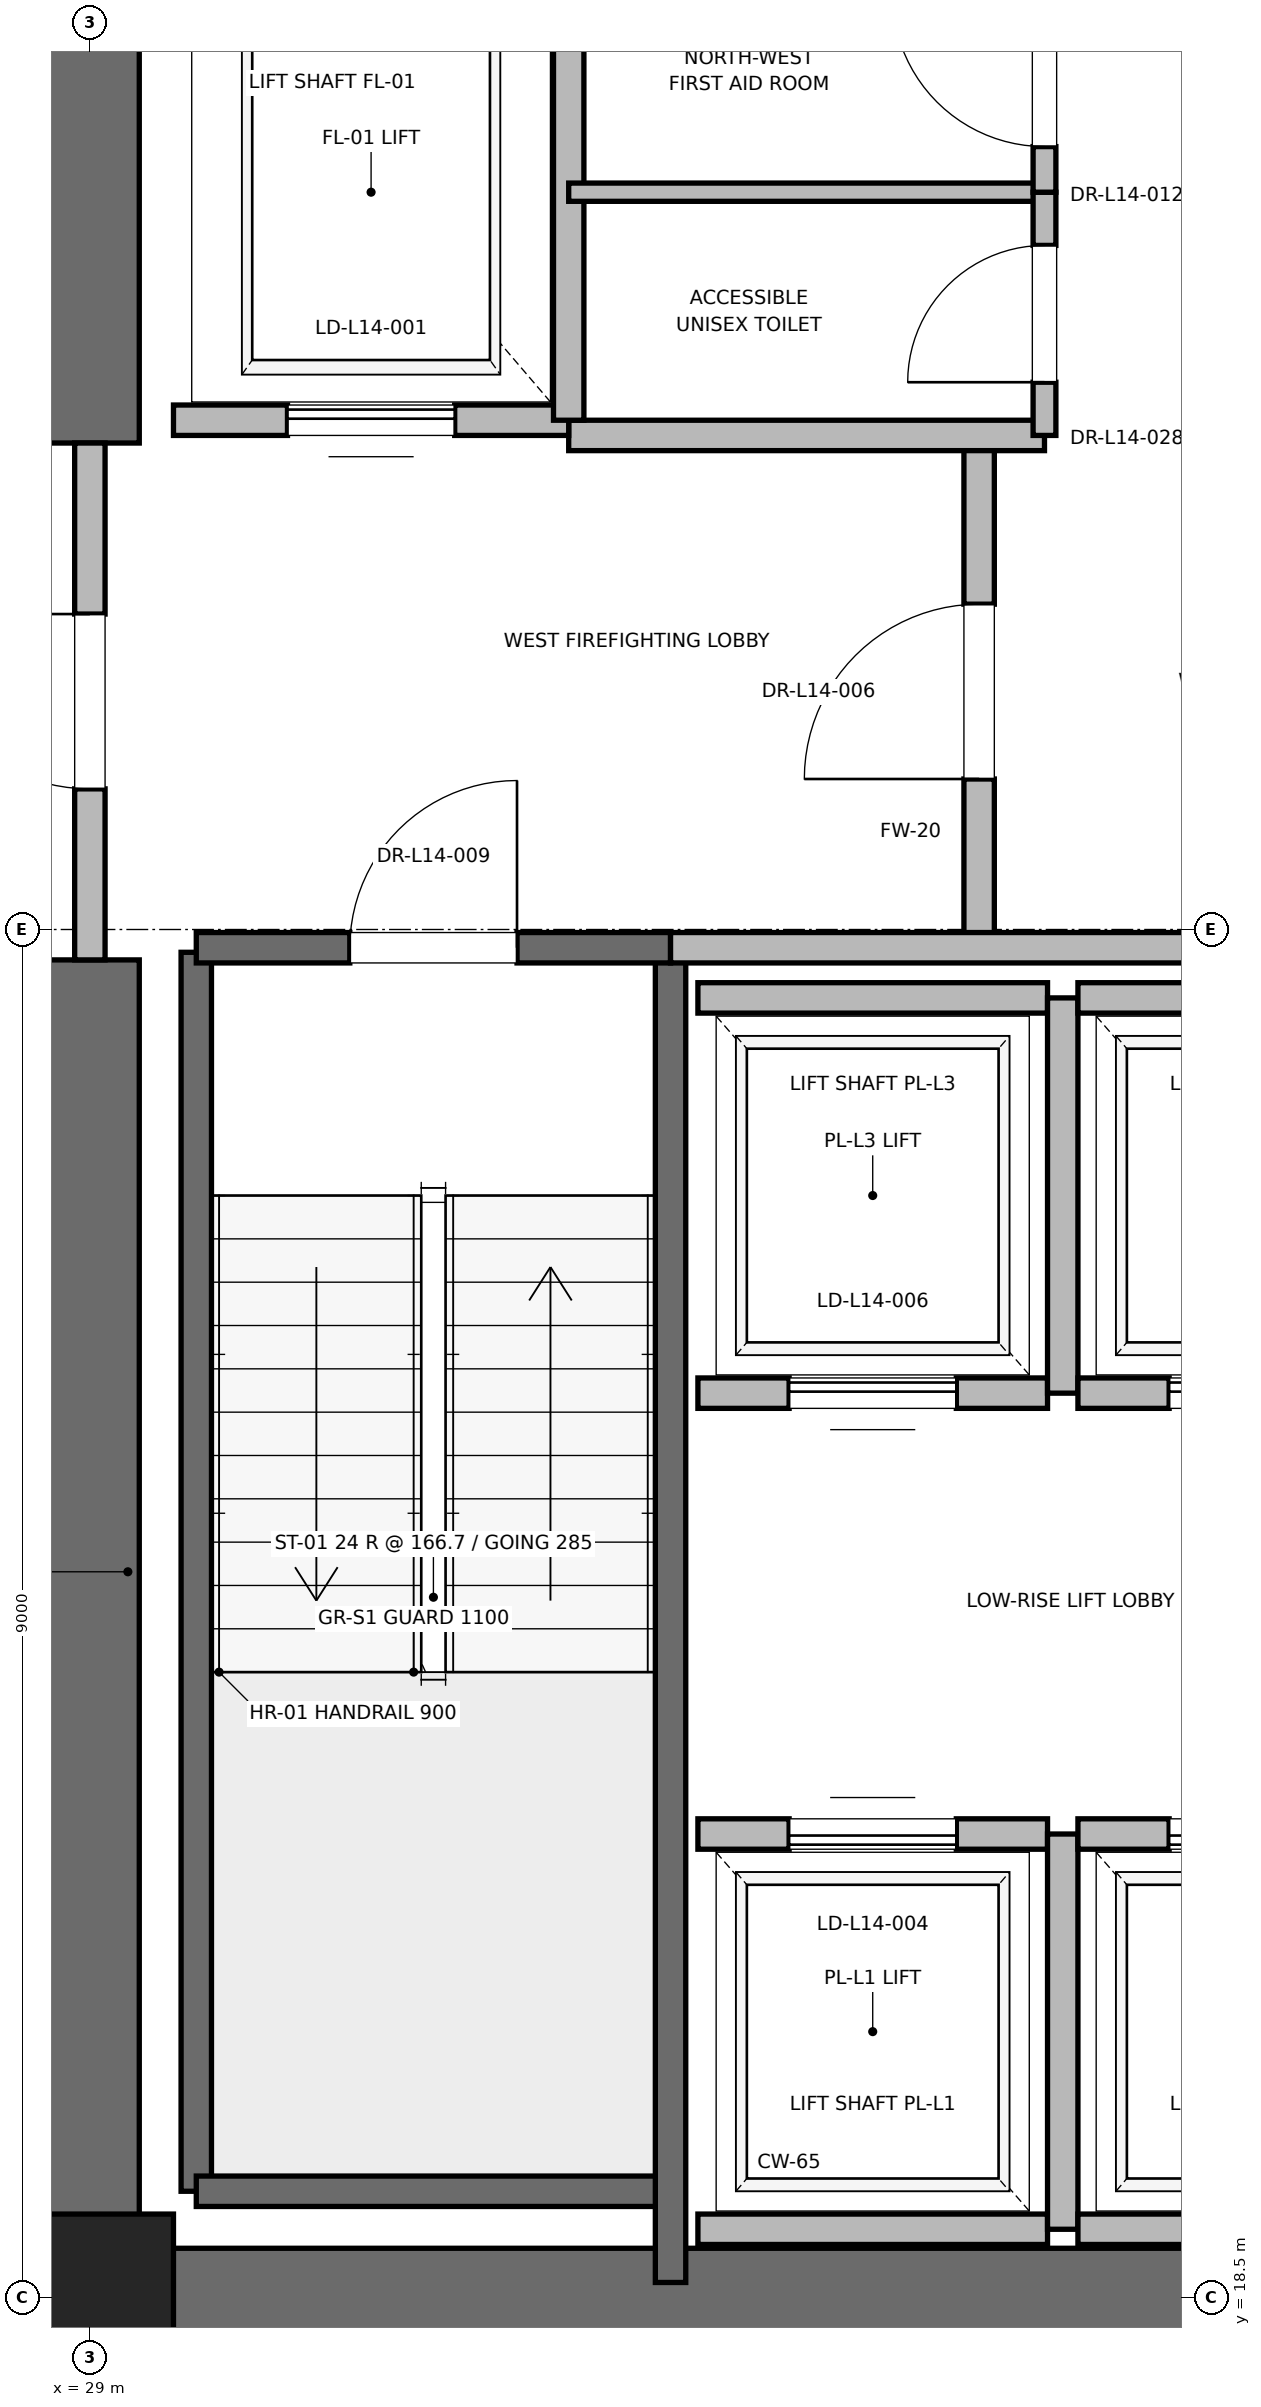
"""IFC4 building model, lengths in metres.
Left out: names, types, materials, properties, quantities, classifications, styles, units other than length and angle.
Written with IfcOpenShell. Run it as: python <this file> out.ifc"""

import sys

from ifc_helpers import new_model, si_unit, direction, frame, frame_2d, origin, origin_2d, place, context, subcontext, project, spatial, rectangle, extrude, element, fill, save


model = new_model("IFC4")
c1 = context("Model", 3, precision=1e-05, world=origin(), true_north=direction((0.0, 1.0)))
c2 = subcontext(c1, "Body", "Model", "MODEL_VIEW")
j1 = project(units=[si_unit("LENGTHUNIT", "METRE"), si_unit("PLANEANGLEUNIT", "RADIAN")], contexts=[c1])
p1 = place(None, origin())
s1 = spatial("IfcSite", under=j1, at=p1, CompositionType="ELEMENT")
p2 = place(p1, origin())
s2 = spatial("IfcBuilding", under=s1, at=p2, CompositionType="ELEMENT")
p3 = place(p2, frame((0.0, 0.0, 63.6)))
s3 = spatial("IfcBuildingStorey", under=s2, at=p3, CompositionType="ELEMENT", Elevation=63.6)
p4 = place(p3, frame((29.0, 18.5, 0.0), z_axis=(0.0, 0.0, 1.0), x_axis=(1.0, 0.0, 0.0)))
e1 = element("IfcColumn", 1, at=p4, inside=s3, PredefinedType="PILASTER", context=c2, shape_type="SweptSolid", body=[
    extrude(rectangle(XDim=1.1, YDim=1.1, at=origin_2d()), origin(), (0.0, 0.0, 1.0), 4.0),
])
p5 = place(p3, frame((29.0, 18.5, 0.0), z_axis=(0.0, 0.0, 1.0), x_axis=(1.0, 0.0, 0.0)))
e2 = element("IfcWall", 2, at=p5, inside=s3, PredefinedType="SHEAR", context=c2, shape_type="SweptSolid", body=[
    extrude(rectangle(XDim=9.2, YDim=0.65, at=frame_2d((4.6, 0.0))), origin(), (0.0, 0.0, 1.0), 3.76),
])
p6 = place(p3, frame((29.0, 18.5, 0.0), z_axis=(0.0, 0.0, 1.0), x_axis=(0.0, 1.0, 0.0)))
e3 = element("IfcWall", 3, at=p6, inside=s3, PredefinedType="SHEAR", context=c2, shape_type="SweptSolid", body=[
    extrude(rectangle(XDim=8.8, YDim=0.65, at=frame_2d((4.4, 0.0))), origin(), (0.0, 0.0, 1.0), 3.76),
])
p7 = place(p3, frame((29.0, 30.7, 0.0), z_axis=(0.0, 0.0, 1.0), x_axis=(0.0, 1.0, 0.0)))
e4 = element("IfcWall", 4, at=p7, inside=s3, PredefinedType="SHEAR", context=c2, shape_type="SweptSolid", body=[
    extrude(rectangle(XDim=5.8, YDim=0.65, at=frame_2d((2.9, 0.0))), origin(), (0.0, 0.0, 1.0), 3.76),
])
p8 = place(p3, frame((29.7, 19.2, 0.0), z_axis=(0.0, 0.0, 1.0), x_axis=(0.0, 1.0, 0.0)))
e5 = element("IfcWall", 5, at=p8, inside=s3, PredefinedType="SOLIDWALL", context=c2, shape_type="SweptSolid", body=[
    extrude(rectangle(XDim=8.15, YDim=0.2, at=frame_2d((4.075, 0.0))), origin(), (0.0, 0.0, 1.0), 3.76),
])
p9 = place(p3, frame((29.7, 19.2, 0.0), z_axis=(0.0, 0.0, 1.0), x_axis=(1.0, 0.0, 0.0)))
e6 = element("IfcWall", 6, at=p9, inside=s3, PredefinedType="SOLIDWALL", context=c2, shape_type="SweptSolid", body=[
    extrude(rectangle(XDim=3.12, YDim=0.2, at=frame_2d((1.56, 0.0))), origin(), (0.0, 0.0, 1.0), 3.76),
])
p10 = place(p3, frame((32.82, 18.6, 0.0), z_axis=(0.0, 0.0, 1.0), x_axis=(0.0, 1.0, 0.0)))
e7 = element("IfcWall", 7, at=p10, inside=s3, PredefinedType="SOLIDWALL", context=c2, shape_type="SweptSolid", body=[
    extrude(rectangle(XDim=8.78, YDim=0.2, at=frame_2d((4.39, 0.0))), origin(), (0.0, 0.0, 1.0), 3.76),
])
p11 = place(p3, frame((29.7, 27.38, 0.0), z_axis=(0.0, 0.0, 1.0), x_axis=(1.0, 0.0, 0.0)))
e8 = element("IfcWall", 8, at=p11, inside=s3, PredefinedType="SOLIDWALL", context=c2, shape_type="SweptSolid", body=[
    extrude(rectangle(XDim=3.12, YDim=0.2, at=frame_2d((1.56, 0.0))), origin(), (0.0, 0.0, 1.0), 3.76),
])
p12 = place(p11, frame((1.01, 0.0, 0.0)))
e9 = element("IfcOpeningElement", 9, at=p12, cuts=e8, PredefinedType="OPENING", context=c2, shape_type="SweptSolid", body=[
    extrude(rectangle(XDim=1.1, YDim=2.15, at=frame_2d((0.55, 1.075))), frame((0.0, 0.1, 0.0), z_axis=(0.0, -1.0, 0.0), x_axis=(1.0, 0.0, 0.0)), (0.0, 0.0, 1.0), 0.2),
])
p13 = place(p3, frame((34.85, 27.38, 0.0), z_axis=(0.0, 0.0, 1.0), x_axis=(0.0, 1.0, 0.0)))
e10 = element("IfcWall", 10, at=p13, inside=s3, PredefinedType="PARTITIONING", context=c2, shape_type="SweptSolid", body=[
    extrude(rectangle(XDim=3.37, YDim=0.2, at=frame_2d((1.685, 0.0))), origin(), (0.0, 0.0, 1.0), 3.76),
])
p14 = place(p13, frame((1.11, 0.0, 0.0)))
e11 = element("IfcOpeningElement", 11, at=p14, cuts=e10, PredefinedType="OPENING", context=c2, shape_type="SweptSolid", body=[
    extrude(rectangle(XDim=1.15, YDim=2.2, at=frame_2d((0.575, 1.1))), frame((0.0, 0.1, 0.0), z_axis=(0.0, -1.0, 0.0), x_axis=(1.0, 0.0, 0.0)), (0.0, 0.0, 1.0), 0.2),
])
p15 = place(p3, frame((29.0, 27.3, 0.0), z_axis=(0.0, 0.0, 1.0), x_axis=(0.0, 1.0, 0.0)))
e12 = element("IfcWall", 12, at=p15, inside=s3, PredefinedType="PARTITIONING", context=c2, shape_type="SweptSolid", body=[
    extrude(rectangle(XDim=3.4, YDim=0.2, at=frame_2d((1.7, 0.0))), origin(), (0.0, 0.0, 1.0), 2.54),
])
p16 = place(p15, frame((1.125, 0.0, 0.0)))
e13 = element("IfcOpeningElement", 13, at=p16, cuts=e12, PredefinedType="OPENING", context=c2, shape_type="SweptSolid", body=[
    extrude(rectangle(XDim=1.15, YDim=2.2, at=frame_2d((0.575, 1.1))), frame((0.0, 0.1, 0.0), z_axis=(0.0, -1.0, 0.0), x_axis=(1.0, 0.0, 0.0)), (0.0, 0.0, 1.0), 0.2),
])
p17 = place(p3, frame((32.82, 27.38, 0.0), z_axis=(0.0, 0.0, 1.0), x_axis=(1.0, 0.0, 0.0)))
e14 = element("IfcWall", 14, at=p17, inside=s3, PredefinedType="PARTITIONING", context=c2, shape_type="SweptSolid", body=[
    extrude(rectangle(XDim=5.62, YDim=0.2, at=frame_2d((2.81, 0.0))), origin(), (0.0, 0.0, 1.0), 3.76),
])
p18 = place(p3, frame((32.15, 30.75, 0.0), z_axis=(0.0, 0.0, 1.0), x_axis=(1.0, 0.0, 0.0)))
e15 = element("IfcWall", 15, at=p18, inside=s3, PredefinedType="PARTITIONING", context=c2, shape_type="SweptSolid", body=[
    extrude(rectangle(XDim=3.13, YDim=0.2, at=frame_2d((1.565, 0.0))), origin(), (0.0, 0.0, 1.0), 3.76),
])
p19 = place(p3, frame((29.55, 30.85, 0.0), z_axis=(0.0, 0.0, 1.0), x_axis=(1.0, 0.0, 0.0)))
e16 = element("IfcWall", 16, at=p19, inside=s3, PredefinedType="SOLIDWALL", context=c2, shape_type="SweptSolid", body=[
    extrude(rectangle(XDim=2.6, YDim=0.2, at=frame_2d((1.3, 0.0))), origin(), (0.0, 0.0, 1.0), 2.54),
])
p20 = place(p19, frame((0.75, 0.0, 0.0)))
e17 = element("IfcOpeningElement", 17, at=p20, cuts=e16, PredefinedType="OPENING", context=c2, shape_type="SweptSolid", body=[
    extrude(rectangle(XDim=1.1, YDim=2.2, at=frame_2d((0.55, 1.1))), frame((0.0, 0.1, 0.0), z_axis=(0.0, -1.0, 0.0), x_axis=(1.0, 0.0, 0.0)), (0.0, 0.0, 1.0), 0.2),
])
p21 = place(p3, frame((32.15, 30.85, 0.0), z_axis=(0.0, 0.0, 1.0), x_axis=(0.0, 1.0, 0.0)))
e18 = element("IfcWall", 18, at=p21, inside=s3, PredefinedType="SOLIDWALL", context=c2, shape_type="SweptSolid", body=[
    extrude(rectangle(XDim=3.0, YDim=0.2, at=frame_2d((1.5, 0.0))), origin(), (0.0, 0.0, 1.0), 3.76),
])
p22 = place(p3, frame((33.0, 18.95, 0.0), z_axis=(0.0, 0.0, 1.0), x_axis=(1.0, 0.0, 0.0)))
e19 = element("IfcWall", 19, at=p22, inside=s3, PredefinedType="SOLIDWALL", context=c2, shape_type="SweptSolid", body=[
    extrude(rectangle(XDim=2.3, YDim=0.2, at=frame_2d((1.15, 0.0))), origin(), (0.0, 0.0, 1.0), 3.76),
])
p23 = place(p3, frame((35.3, 21.55, 0.0), z_axis=(0.0, 0.0, 1.0), x_axis=(-1.0, 0.0, 0.0)))
e20 = element("IfcWall", 20, at=p23, inside=s3, PredefinedType="SOLIDWALL", context=c2, shape_type="SweptSolid", body=[
    extrude(rectangle(XDim=2.3, YDim=0.2, at=frame_2d((1.15, 0.0))), origin(), (0.0, 0.0, 1.0), 3.76),
])
p24 = place(p23, frame((0.6, 0.0, 0.0)))
e21 = element("IfcOpeningElement", 21, at=p24, cuts=e20, PredefinedType="OPENING", context=c2, shape_type="SweptSolid", body=[
    extrude(rectangle(XDim=1.1, YDim=2.2, at=frame_2d((0.55, 1.1))), frame((0.0, 0.1, 0.0), z_axis=(0.0, -1.0, 0.0), x_axis=(1.0, 0.0, 0.0)), (0.0, 0.0, 1.0), 0.2),
])
p25 = place(p3, frame((35.4, 18.95, 0.0), z_axis=(0.0, 0.0, 1.0), x_axis=(0.0, 1.0, 0.0)))
e22 = element("IfcWall", 22, at=p25, inside=s3, PredefinedType="SOLIDWALL", context=c2, shape_type="SweptSolid", body=[
    extrude(rectangle(XDim=2.6, YDim=0.2, at=frame_2d((1.3, 0.0))), origin(), (0.0, 0.0, 1.0), 3.76),
])
p26 = place(p3, frame((35.5, 18.95, 0.0), z_axis=(0.0, 0.0, 1.0), x_axis=(1.0, 0.0, 0.0)))
e23 = element("IfcWall", 23, at=p26, inside=s3, PredefinedType="SOLIDWALL", context=c2, shape_type="SweptSolid", body=[
    extrude(rectangle(XDim=2.3, YDim=0.2, at=frame_2d((1.15, 0.0))), origin(), (0.0, 0.0, 1.0), 2.54),
])
p27 = place(p3, frame((37.8, 21.55, 0.0), z_axis=(0.0, 0.0, 1.0), x_axis=(-1.0, 0.0, 0.0)))
e24 = element("IfcWall", 24, at=p27, inside=s3, PredefinedType="SOLIDWALL", context=c2, shape_type="SweptSolid", body=[
    extrude(rectangle(XDim=2.3, YDim=0.2, at=frame_2d((1.15, 0.0))), origin(), (0.0, 0.0, 1.0), 3.76),
])
p28 = place(p27, frame((0.6, 0.0, 0.0)))
e25 = element("IfcOpeningElement", 25, at=p28, cuts=e24, PredefinedType="OPENING", context=c2, shape_type="SweptSolid", body=[
    extrude(rectangle(XDim=1.1, YDim=2.2, at=frame_2d((0.55, 1.1))), frame((0.0, 0.1, 0.0), z_axis=(0.0, -1.0, 0.0), x_axis=(1.0, 0.0, 0.0)), (0.0, 0.0, 1.0), 0.2),
])
p29 = place(p3, frame((33.0, 24.45, 0.0), z_axis=(0.0, 0.0, 1.0), x_axis=(1.0, 0.0, 0.0)))
e26 = element("IfcWall", 26, at=p29, inside=s3, PredefinedType="SOLIDWALL", context=c2, shape_type="SweptSolid", body=[
    extrude(rectangle(XDim=2.3, YDim=0.2, at=frame_2d((1.15, 0.0))), origin(), (0.0, 0.0, 1.0), 3.76),
])
p30 = place(p29, frame((0.6, 0.0, 0.0)))
e27 = element("IfcOpeningElement", 27, at=p30, cuts=e26, PredefinedType="OPENING", context=c2, shape_type="SweptSolid", body=[
    extrude(rectangle(XDim=1.1, YDim=2.2, at=frame_2d((0.55, 1.1))), frame((0.0, 0.1, 0.0), z_axis=(0.0, -1.0, 0.0), x_axis=(1.0, 0.0, 0.0)), (0.0, 0.0, 1.0), 0.2),
])
p31 = place(p3, frame((35.3, 27.05, 0.0), z_axis=(0.0, 0.0, 1.0), x_axis=(-1.0, 0.0, 0.0)))
e28 = element("IfcWall", 28, at=p31, inside=s3, PredefinedType="SOLIDWALL", context=c2, shape_type="SweptSolid", body=[
    extrude(rectangle(XDim=2.3, YDim=0.2, at=frame_2d((1.15, 0.0))), origin(), (0.0, 0.0, 1.0), 3.76),
])
p32 = place(p3, frame((35.4, 24.45, 0.0), z_axis=(0.0, 0.0, 1.0), x_axis=(0.0, 1.0, 0.0)))
e29 = element("IfcWall", 29, at=p32, inside=s3, PredefinedType="SOLIDWALL", context=c2, shape_type="SweptSolid", body=[
    extrude(rectangle(XDim=2.6, YDim=0.2, at=frame_2d((1.3, 0.0))), origin(), (0.0, 0.0, 1.0), 3.76),
])
p33 = place(p3, frame((35.5, 24.45, 0.0), z_axis=(0.0, 0.0, 1.0), x_axis=(1.0, 0.0, 0.0)))
e30 = element("IfcWall", 30, at=p33, inside=s3, PredefinedType="SOLIDWALL", context=c2, shape_type="SweptSolid", body=[
    extrude(rectangle(XDim=2.3, YDim=0.2, at=frame_2d((1.15, 0.0))), origin(), (0.0, 0.0, 1.0), 3.76),
])
p34 = place(p33, frame((0.6, 0.0, 0.0)))
e31 = element("IfcOpeningElement", 31, at=p34, cuts=e30, PredefinedType="OPENING", context=c2, shape_type="SweptSolid", body=[
    extrude(rectangle(XDim=1.1, YDim=2.2, at=frame_2d((0.55, 1.1))), frame((0.0, 0.1, 0.0), z_axis=(0.0, -1.0, 0.0), x_axis=(1.0, 0.0, 0.0)), (0.0, 0.0, 1.0), 0.2),
])
p35 = place(p3, frame((37.8, 27.05, 0.0), z_axis=(0.0, 0.0, 1.0), x_axis=(-1.0, 0.0, 0.0)))
e32 = element("IfcWall", 32, at=p35, inside=s3, PredefinedType="SOLIDWALL", context=c2, shape_type="SweptSolid", body=[
    extrude(rectangle(XDim=2.3, YDim=0.2, at=frame_2d((1.15, 0.0))), origin(), (0.0, 0.0, 1.0), 3.76),
])
p36 = place(p3, frame((32.15, 32.35, 0.0), z_axis=(0.0, 0.0, 1.0), x_axis=(1.0, 0.0, 0.0)))
e33 = element("IfcWall", 33, at=p36, inside=s3, PredefinedType="PARTITIONING", context=c2, shape_type="SweptSolid", body=[
    extrude(rectangle(XDim=3.13, YDim=0.12, at=frame_2d((1.565, 0.0))), origin(), (0.0, 0.0, 1.0), 2.85),
])
p37 = place(p3, frame((35.28, 30.75, 0.0), z_axis=(0.0, 0.0, 1.0), x_axis=(0.0, 1.0, 0.0)))
e34 = element("IfcWall", 34, at=p37, inside=s3, PredefinedType="PARTITIONING", context=c2, shape_type="SweptSolid", body=[
    extrude(rectangle(XDim=1.6, YDim=0.15, at=frame_2d((0.8, 0.0))), origin(), (0.0, 0.0, 1.0), 2.85),
])
p38 = place(p37, frame((0.35, 0.0, 0.0)))
e35 = element("IfcOpeningElement", 35, at=p38, cuts=e34, PredefinedType="OPENING", context=c2, shape_type="SweptSolid", body=[
    extrude(rectangle(XDim=0.9, YDim=2.1, at=frame_2d((0.45, 1.05))), frame((0.0, 0.075, 0.0), z_axis=(0.0, -1.0, 0.0), x_axis=(1.0, 0.0, 0.0)), (0.0, 0.0, 1.0), 0.15),
])
p39 = place(p3, frame((35.28, 32.35, 0.0), z_axis=(0.0, 0.0, 1.0), x_axis=(0.0, 1.0, 0.0)))
e36 = element("IfcWall", 36, at=p39, inside=s3, PredefinedType="PARTITIONING", context=c2, shape_type="SweptSolid", body=[
    extrude(rectangle(XDim=1.6, YDim=0.15, at=frame_2d((0.8, 0.0))), origin(), (0.0, 0.0, 1.0), 2.85),
])
p40 = place(p39, frame((0.3, 0.0, 0.0)))
e37 = element("IfcOpeningElement", 37, at=p40, cuts=e36, PredefinedType="OPENING", context=c2, shape_type="SweptSolid", body=[
    extrude(rectangle(XDim=1.0, YDim=2.15, at=frame_2d((0.5, 1.075))), frame((0.0, 0.075, 0.0), z_axis=(0.0, -1.0, 0.0), x_axis=(1.0, 0.0, 0.0)), (0.0, 0.0, 1.0), 0.15),
])
p41 = place(p12, origin())
e38 = element("IfcDoor", 38, at=p41, inside=s3, OperationType="SINGLE_SWING_RIGHT", PredefinedType="DOOR", context=c2, shape_type="SweptSolid", body=[
    extrude(rectangle(XDim=1.1, YDim=2.15, at=frame_2d((0.55, 1.075))), frame((0.0, 0.025, 0.0), z_axis=(0.0, -1.0, 0.0), x_axis=(1.0, 0.0, 0.0)), (0.0, 0.0, 1.0), 0.05),
])
fill(e9, e38)
p42 = place(p14, origin())
e39 = element("IfcDoor", 39, at=p42, inside=s3, OperationType="SINGLE_SWING_LEFT", PredefinedType="DOOR", context=c2, shape_type="SweptSolid", body=[
    extrude(rectangle(XDim=1.15, YDim=2.2, at=frame_2d((0.575, 1.1))), frame((0.0, 0.025, 0.0), z_axis=(0.0, -1.0, 0.0), x_axis=(1.0, 0.0, 0.0)), (0.0, 0.0, 1.0), 0.05),
])
fill(e11, e39)
p43 = place(p16, origin())
e40 = element("IfcDoor", 40, at=p43, inside=s3, OperationType="SINGLE_SWING_RIGHT", PredefinedType="DOOR", context=c2, shape_type="SweptSolid", body=[
    extrude(rectangle(XDim=1.15, YDim=2.2, at=frame_2d((0.575, 1.1))), frame((0.0, 0.025, 0.0), z_axis=(0.0, -1.0, 0.0), x_axis=(1.0, 0.0, 0.0)), (0.0, 0.0, 1.0), 0.05),
])
fill(e13, e40)
p44 = place(p20, origin())
e41 = element("IfcDoor", 41, at=p44, inside=s3, OperationType="SLIDING_TO_RIGHT", PredefinedType="DOOR", context=c2, shape_type="SweptSolid", body=[
    extrude(rectangle(XDim=1.1, YDim=2.2, at=frame_2d((0.55, 1.1))), frame((0.0, 0.025, 0.0), z_axis=(0.0, -1.0, 0.0), x_axis=(1.0, 0.0, 0.0)), (0.0, 0.0, 1.0), 0.05),
])
fill(e17, e41)
p45 = place(p24, origin())
e42 = element("IfcDoor", 42, at=p45, inside=s3, OperationType="SLIDING_TO_RIGHT", PredefinedType="DOOR", context=c2, shape_type="SweptSolid", body=[
    extrude(rectangle(XDim=1.1, YDim=2.2, at=frame_2d((0.55, 1.1))), frame((0.0, 0.025, 0.0), z_axis=(0.0, -1.0, 0.0), x_axis=(1.0, 0.0, 0.0)), (0.0, 0.0, 1.0), 0.05),
])
fill(e21, e42)
p46 = place(p28, origin())
e43 = element("IfcDoor", 43, at=p46, inside=s3, OperationType="SLIDING_TO_RIGHT", PredefinedType="DOOR", context=c2, shape_type="SweptSolid", body=[
    extrude(rectangle(XDim=1.1, YDim=2.2, at=frame_2d((0.55, 1.1))), frame((0.0, 0.025, 0.0), z_axis=(0.0, -1.0, 0.0), x_axis=(1.0, 0.0, 0.0)), (0.0, 0.0, 1.0), 0.05),
])
fill(e25, e43)
p47 = place(p30, origin())
e44 = element("IfcDoor", 44, at=p47, inside=s3, OperationType="SLIDING_TO_RIGHT", PredefinedType="DOOR", context=c2, shape_type="SweptSolid", body=[
    extrude(rectangle(XDim=1.1, YDim=2.2, at=frame_2d((0.55, 1.1))), frame((0.0, 0.025, 0.0), z_axis=(0.0, -1.0, 0.0), x_axis=(1.0, 0.0, 0.0)), (0.0, 0.0, 1.0), 0.05),
])
fill(e27, e44)
p48 = place(p34, origin())
e45 = element("IfcDoor", 45, at=p48, inside=s3, OperationType="SLIDING_TO_RIGHT", PredefinedType="DOOR", context=c2, shape_type="SweptSolid", body=[
    extrude(rectangle(XDim=1.1, YDim=2.2, at=frame_2d((0.55, 1.1))), frame((0.0, 0.025, 0.0), z_axis=(0.0, -1.0, 0.0), x_axis=(1.0, 0.0, 0.0)), (0.0, 0.0, 1.0), 0.05),
])
fill(e31, e45)
p49 = place(p38, origin())
e46 = element("IfcDoor", 46, at=p49, inside=s3, OperationType="SINGLE_SWING_LEFT", PredefinedType="DOOR", context=c2, shape_type="SweptSolid", body=[
    extrude(rectangle(XDim=0.9, YDim=2.1, at=frame_2d((0.45, 1.05))), frame((0.0, 0.025, 0.0), z_axis=(0.0, -1.0, 0.0), x_axis=(1.0, 0.0, 0.0)), (0.0, 0.0, 1.0), 0.05),
])
fill(e35, e46)
p50 = place(p40, origin())
e47 = element("IfcDoor", 47, at=p50, inside=s3, OperationType="SINGLE_SWING_RIGHT", PredefinedType="DOOR", context=c2, shape_type="SweptSolid", body=[
    extrude(rectangle(XDim=1.0, YDim=2.15, at=frame_2d((0.5, 1.075))), frame((0.0, 0.025, 0.0), z_axis=(0.0, -1.0, 0.0), x_axis=(1.0, 0.0, 0.0)), (0.0, 0.0, 1.0), 0.05),
])
fill(e37, e47)
save(model, sys.argv[1])
